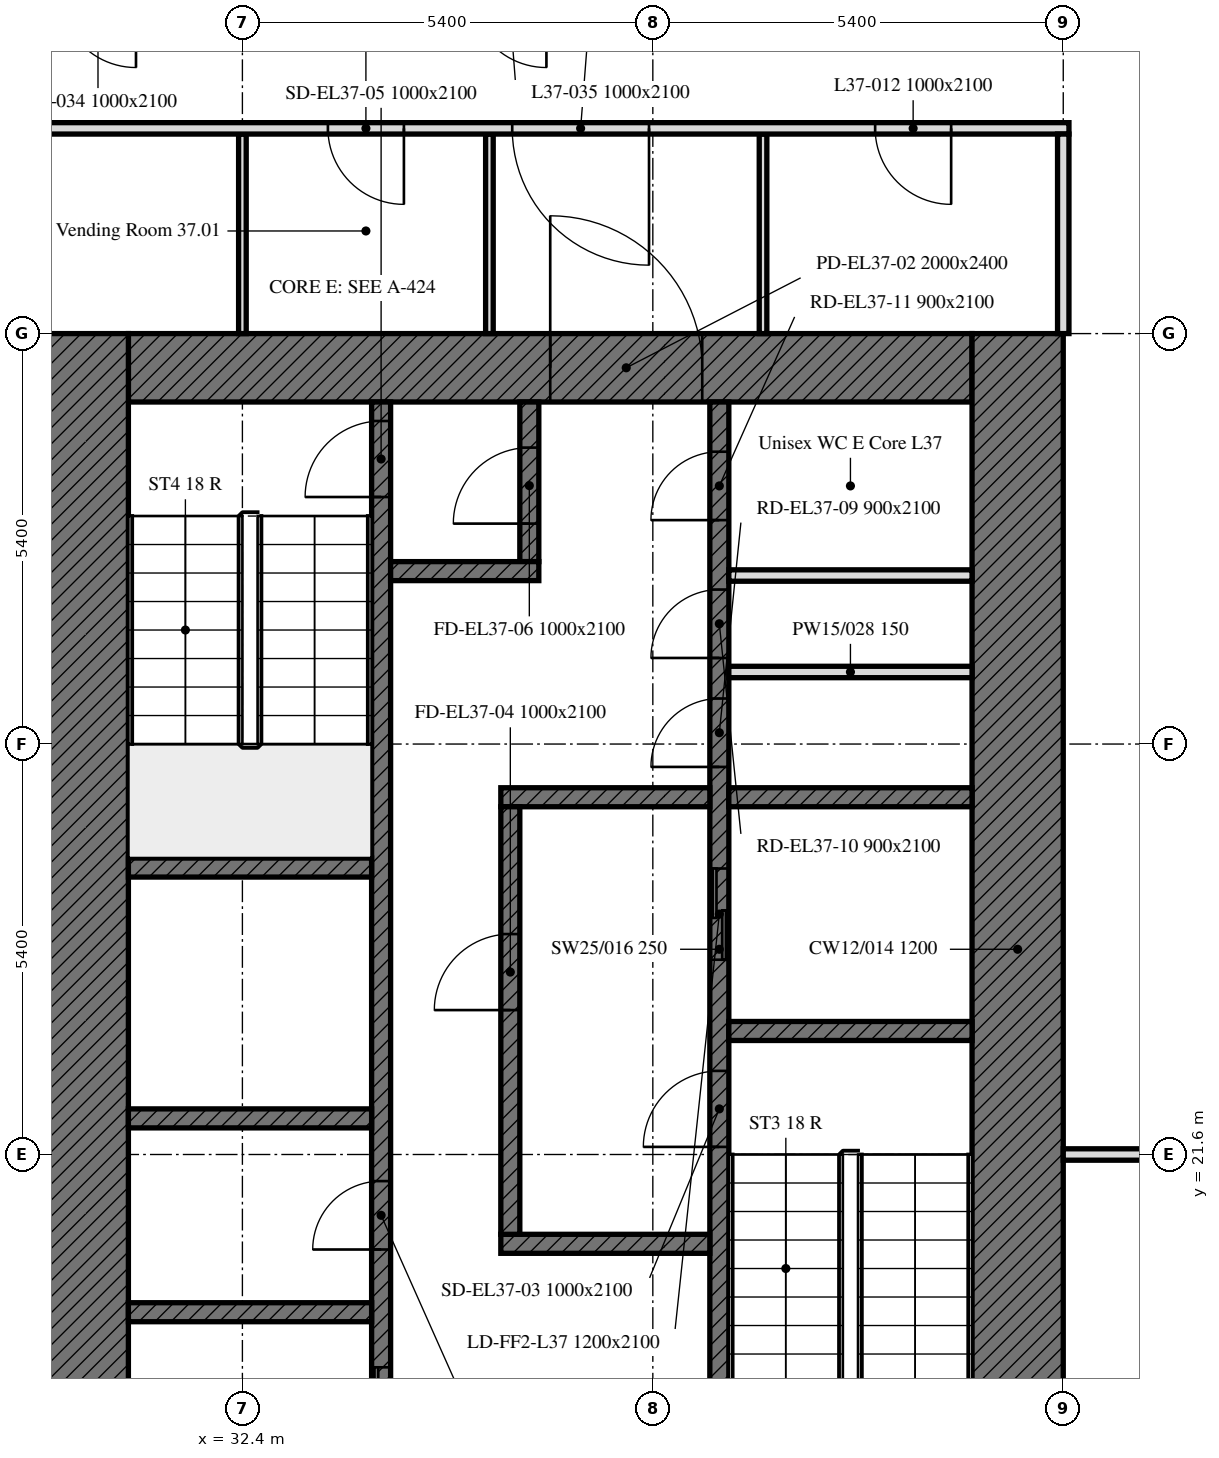
"""IFC4 building model, lengths in metres.
Left out: names, types, materials, properties, quantities, classifications, styles, units other than length and angle.
Written with IfcOpenShell. Run it as: python <this file> out.ifc"""

import sys

from ifc_helpers import new_model, si_unit, direction, frame, frame_2d, origin, place, context, subcontext, project, spatial, rectangle, extrude, element, fill, save


model = new_model("IFC4")
c1 = context("Model", 3, precision=1e-05, world=origin(), true_north=direction((0.0, 1.0)))
c2 = subcontext(c1, "Body", "Model", "MODEL_VIEW")
j1 = project(units=[si_unit("LENGTHUNIT", "METRE"), si_unit("PLANEANGLEUNIT", "RADIAN")], contexts=[c1])
p1 = place(None, origin())
s1 = spatial("IfcSite", under=j1, at=p1, CompositionType="ELEMENT")
p2 = place(p1, origin())
s2 = spatial("IfcBuilding", under=s1, at=p2, CompositionType="ELEMENT")
p3 = place(p2, frame((0.0, 0.0, 159.4)))
s3 = spatial("IfcBuildingStorey", under=s2, at=p3, CompositionType="ELEMENT", Elevation=159.4)
p4 = place(p3, frame((30.9, 31.95, 0.0), z_axis=(0.0, 0.0, 1.0), x_axis=(1.0, 0.0, 0.0)))
e1 = element("IfcWall", 1, at=p4, inside=s3, PredefinedType="SOLIDWALL", context=c2, shape_type="SweptSolid", body=[
    extrude(rectangle(XDim=11.1, YDim=0.9, at=frame_2d((5.55, 0.0))), origin(), (0.0, 0.0, 1.0), 3.0),
])
p5 = place(p4, frame((5.55, 0.0, 0.0)))
e2 = element("IfcOpeningElement", 2, at=p5, cuts=e1, PredefinedType="OPENING", context=c2, shape_type="SweptSolid", body=[
    extrude(rectangle(XDim=2.0, YDim=2.4, at=frame_2d((1.0, 1.2))), frame((0.0, 0.45, 0.0), z_axis=(0.0, -1.0, 0.0), x_axis=(1.0, 0.0, 0.0)), (0.0, 0.0, 1.0), 0.9),
])
for number, where, z_axis, x_axis in (
    (3, (42.6, 32.4, 0.0), (0.0, 0.0, 1.0), (0.0, -1.0, 0.0)),
    (4, (30.3, 16.2, 0.0), (0.0, 0.0, 1.0), (0.0, 1.0, 0.0)),
):
    element("IfcWall", number, at=place(p3, frame(where, z_axis=z_axis, x_axis=x_axis)), inside=s3, PredefinedType="SOLIDWALL", context=c2, shape_type="SweptSolid", body=[
        extrude(rectangle(XDim=16.2, YDim=1.2, at=frame_2d((8.1, 0.0))), origin(), (0.0, 0.0, 1.0), 3.0),
    ])
p6 = place(p3, frame((38.675, 17.1, 0.0), z_axis=(0.0, 0.0, 1.0), x_axis=(0.0, 1.0, 0.0)))
e5 = element("IfcWall", 5, at=p6, inside=s3, PredefinedType="SOLIDWALL", context=c2, shape_type="SweptSolid", body=[
    extrude(rectangle(XDim=14.4, YDim=0.25, at=frame_2d((7.2, 0.0))), origin(), (0.0, 0.0, 1.0), 3.0),
])
p7 = place(p6, frame((4.6, 0.0, 0.0)))
e6 = element("IfcOpeningElement", 6, at=p7, cuts=e5, PredefinedType="OPENING", context=c2, shape_type="SweptSolid", body=[
    extrude(rectangle(XDim=1.0, YDim=2.1, at=frame_2d((0.5, 1.05))), frame((0.0, 0.125, 0.0), z_axis=(0.0, -1.0, 0.0), x_axis=(1.0, 0.0, 0.0)), (0.0, 0.0, 1.0), 0.25),
])
p8 = place(p6, frame((7.062, 0.0, 0.0)))
e7 = element("IfcOpeningElement", 7, at=p8, cuts=e5, PredefinedType="OPENING", context=c2, shape_type="SweptSolid", body=[
    extrude(rectangle(XDim=1.2, YDim=2.1, at=frame_2d((0.6, 1.05))), frame((0.0, 0.125, 0.0), z_axis=(0.0, -1.0, 0.0), x_axis=(1.0, 0.0, 0.0)), (0.0, 0.0, 1.0), 0.25),
])
p9 = place(p6, frame((9.599, 0.0, 0.0)))
e8 = element("IfcOpeningElement", 8, at=p9, cuts=e5, PredefinedType="OPENING", context=c2, shape_type="SweptSolid", body=[
    extrude(rectangle(XDim=0.9, YDim=2.1, at=frame_2d((0.45, 1.05))), frame((0.0, 0.125, 0.0), z_axis=(0.0, -1.0, 0.0), x_axis=(1.0, 0.0, 0.0)), (0.0, 0.0, 1.0), 0.25),
])
p10 = place(p6, frame((11.032, 0.0, 0.0)))
e9 = element("IfcOpeningElement", 9, at=p10, cuts=e5, PredefinedType="OPENING", context=c2, shape_type="SweptSolid", body=[
    extrude(rectangle(XDim=0.9, YDim=2.1, at=frame_2d((0.45, 1.05))), frame((0.0, 0.125, 0.0), z_axis=(0.0, -1.0, 0.0), x_axis=(1.0, 0.0, 0.0)), (0.0, 0.0, 1.0), 0.25),
])
p11 = place(p6, frame((12.846, 0.0, 0.0)))
e10 = element("IfcOpeningElement", 10, at=p11, cuts=e5, PredefinedType="OPENING", context=c2, shape_type="SweptSolid", body=[
    extrude(rectangle(XDim=0.9, YDim=2.1, at=frame_2d((0.45, 1.05))), frame((0.0, 0.125, 0.0), z_axis=(0.0, -1.0, 0.0), x_axis=(1.0, 0.0, 0.0)), (0.0, 0.0, 1.0), 0.25),
])
p12 = place(p3, frame((34.225, 17.1, 0.0), z_axis=(0.0, 0.0, 1.0), x_axis=(0.0, 1.0, 0.0)))
e11 = element("IfcWall", 11, at=p12, inside=s3, PredefinedType="SOLIDWALL", context=c2, shape_type="SweptSolid", body=[
    extrude(rectangle(XDim=14.4, YDim=0.25, at=frame_2d((7.2, 0.0))), origin(), (0.0, 0.0, 1.0), 3.0),
])
p13 = place(p12, frame((13.15, 0.0, 0.0)))
e12 = element("IfcOpeningElement", 12, at=p13, cuts=e11, PredefinedType="OPENING", context=c2, shape_type="SweptSolid", body=[
    extrude(rectangle(XDim=1.0, YDim=2.1, at=frame_2d((0.5, 1.05))), frame((0.0, 0.125, 0.0), z_axis=(0.0, -1.0, 0.0), x_axis=(1.0, 0.0, 0.0)), (0.0, 0.0, 1.0), 0.25),
])
p14 = place(p12, frame((0.6, 0.0, 0.0)))
e13 = element("IfcOpeningElement", 13, at=p14, cuts=e11, PredefinedType="OPENING", context=c2, shape_type="SweptSolid", body=[
    extrude(rectangle(XDim=1.1, YDim=2.1, at=frame_2d((0.55, 1.05))), frame((0.0, 0.125, 0.0), z_axis=(0.0, -1.0, 0.0), x_axis=(1.0, 0.0, 0.0)), (0.0, 0.0, 1.0), 0.25),
])
p15 = place(p12, frame((3.25, 0.0, 0.0)))
e14 = element("IfcOpeningElement", 14, at=p15, cuts=e11, PredefinedType="OPENING", context=c2, shape_type="SweptSolid", body=[
    extrude(rectangle(XDim=0.9, YDim=2.1, at=frame_2d((0.45, 1.05))), frame((0.0, 0.125, 0.0), z_axis=(0.0, -1.0, 0.0), x_axis=(1.0, 0.0, 0.0)), (0.0, 0.0, 1.0), 0.25),
])
p16 = place(p3, frame((38.8, 23.225, 0.0), z_axis=(0.0, 0.0, 1.0), x_axis=(1.0, 0.0, 0.0)))
e15 = element("IfcWall", 15, at=p16, inside=s3, PredefinedType="SOLIDWALL", context=c2, shape_type="SweptSolid", body=[
    extrude(rectangle(XDim=3.2, YDim=0.25, at=frame_2d((1.6, 0.0))), origin(), (0.0, 0.0, 1.0), 3.0),
])
for number, where, z_axis, x_axis in (
    (16, (30.9, 25.375, 0.0), (0.0, 0.0, 1.0), (1.0, 0.0, 0.0)),
    (17, (30.9, 22.075, 0.0), (0.0, 0.0, 1.0), (1.0, 0.0, 0.0)),
):
    element("IfcWall", number, at=place(p3, frame(where, z_axis=z_axis, x_axis=x_axis)), inside=s3, PredefinedType="SOLIDWALL", context=c2, shape_type="SweptSolid", body=[
        extrude(rectangle(XDim=3.2, YDim=0.25, at=frame_2d((1.6, 0.0))), origin(), (0.0, 0.0, 1.0), 3.0),
    ])
p17 = place(p3, frame((38.8, 26.3, 0.0), z_axis=(0.0, 0.0, 1.0), x_axis=(1.0, 0.0, 0.0)))
e18 = element("IfcWall", 18, at=p17, inside=s3, PredefinedType="SOLIDWALL", context=c2, shape_type="SweptSolid", body=[
    extrude(rectangle(XDim=3.2, YDim=0.25, at=frame_2d((1.6, 0.0))), origin(), (0.0, 0.0, 1.0), 3.0),
])
for number, where, z_axis, x_axis in (
    (19, (35.8, 26.3, 0.0), (0.0, 0.0, 1.0), (1.0, 0.0, 0.0)),
    (20, (35.8, 20.425, 0.0), (0.0, 0.0, 1.0), (1.0, 0.0, 0.0)),
):
    element("IfcWall", number, at=place(p3, frame(where, z_axis=z_axis, x_axis=x_axis)), inside=s3, PredefinedType="SOLIDWALL", context=c2, shape_type="SweptSolid", body=[
        extrude(rectangle(XDim=2.75, YDim=0.25, at=frame_2d((1.375, 0.0))), origin(), (0.0, 0.0, 1.0), 3.0),
    ])
p18 = place(p3, frame((36.175, 29.4, 0.0), z_axis=(0.0, 0.0, 1.0), x_axis=(0.0, 1.0, 0.0)))
e21 = element("IfcWall", 21, at=p18, inside=s3, PredefinedType="SOLIDWALL", context=c2, shape_type="SweptSolid", body=[
    extrude(rectangle(XDim=2.1, YDim=0.25, at=frame_2d((1.05, 0.0))), origin(), (0.0, 0.0, 1.0), 3.0),
])
p19 = place(p18, frame((0.5, 0.0, 0.0)))
e22 = element("IfcOpeningElement", 22, at=p19, cuts=e21, PredefinedType="OPENING", context=c2, shape_type="SweptSolid", body=[
    extrude(rectangle(XDim=1.0, YDim=2.1, at=frame_2d((0.5, 1.05))), frame((0.0, 0.125, 0.0), z_axis=(0.0, -1.0, 0.0), x_axis=(1.0, 0.0, 0.0)), (0.0, 0.0, 1.0), 0.25),
])
p20 = place(p3, frame((34.35, 29.275, 0.0), z_axis=(0.0, 0.0, 1.0), x_axis=(1.0, 0.0, 0.0)))
e23 = element("IfcWall", 23, at=p20, inside=s3, PredefinedType="SOLIDWALL", context=c2, shape_type="SweptSolid", body=[
    extrude(rectangle(XDim=1.95, YDim=0.25, at=frame_2d((0.975, 0.0))), origin(), (0.0, 0.0, 1.0), 3.0),
])
p21 = place(p3, frame((35.925, 20.55, 0.0), z_axis=(0.0, 0.0, 1.0), x_axis=(0.0, 1.0, 0.0)))
e24 = element("IfcWall", 24, at=p21, inside=s3, PredefinedType="SOLIDWALL", context=c2, shape_type="SweptSolid", body=[
    extrude(rectangle(XDim=5.625, YDim=0.25, at=frame_2d((2.812, 0.0))), origin(), (0.0, 0.0, 1.0), 3.0),
])
p22 = place(p21, frame((2.95, 0.0, 0.0)))
e25 = element("IfcOpeningElement", 25, at=p22, cuts=e24, PredefinedType="OPENING", context=c2, shape_type="SweptSolid", body=[
    extrude(rectangle(XDim=1.0, YDim=2.1, at=frame_2d((0.5, 1.05))), frame((0.0, 0.125, 0.0), z_axis=(0.0, -1.0, 0.0), x_axis=(1.0, 0.0, 0.0)), (0.0, 0.0, 1.0), 0.25),
])
p23 = place(p3, frame((30.9, 19.525, 0.0), z_axis=(0.0, 0.0, 1.0), x_axis=(1.0, 0.0, 0.0)))
e26 = element("IfcWall", 26, at=p23, inside=s3, PredefinedType="SOLIDWALL", context=c2, shape_type="SweptSolid", body=[
    extrude(rectangle(XDim=3.2, YDim=0.25, at=frame_2d((1.6, 0.0))), origin(), (0.0, 0.0, 1.0), 3.0),
])
for number, where, z_axis, x_axis in (
    (27, (38.8, 27.948, 0.0), (0.0, 0.0, 1.0), (1.0, 0.0, 0.0)),
    (28, (38.8, 29.217, 0.0), (0.0, 0.0, 1.0), (1.0, 0.0, 0.0)),
):
    element("IfcWall", number, at=place(p3, frame(where, z_axis=z_axis, x_axis=x_axis)), inside=s3, PredefinedType="PARTITIONING", context=c2, shape_type="SweptSolid", body=[
        extrude(rectangle(XDim=3.2, YDim=0.15, at=frame_2d((1.6, 0.0))), origin(), (0.0, 0.0, 1.0), 3.0),
    ])
for number, where, z_axis, x_axis in (
    (29, (32.4, 32.4, 0.0), (0.0, 0.0, 1.0), (0.0, 1.0, 0.0)),
    (30, (35.65, 35.025, 0.0), (0.0, 0.0, 1.0), (0.0, -1.0, 0.0)),
    (31, (39.25, 32.4, 0.0), (0.0, 0.0, 1.0), (0.0, 1.0, 0.0)),
):
    element("IfcWall", number, at=place(p3, frame(where, z_axis=z_axis, x_axis=x_axis)), inside=s3, PredefinedType="PARTITIONING", context=c2, shape_type="SweptSolid", body=[
        extrude(rectangle(XDim=2.625, YDim=0.1, at=frame_2d((1.312, 0.0))), origin(), (0.0, 0.0, 1.0), 3.0),
    ])
p24 = place(p3, frame((43.2, 21.6, 0.0), z_axis=(0.0, 0.0, 1.0), x_axis=(1.0, 0.0, 0.0)))
e32 = element("IfcWall", 32, at=p24, inside=s3, PredefinedType="PARTITIONING", context=c2, shape_type="SweptSolid", body=[
    extrude(rectangle(XDim=4.649, YDim=0.15, at=frame_2d((2.325, 0.0))), origin(), (0.0, 0.0, 1.0), 2.4),
])
p25 = place(p3, frame((43.275, 35.1, 0.0), z_axis=(0.0, 0.0, 1.0), x_axis=(-1.0, 0.0, 0.0)))
e33 = element("IfcWall", 33, at=p25, inside=s3, PredefinedType="PARTITIONING", context=c2, shape_type="SweptSolid", body=[
    extrude(rectangle(XDim=37.124, YDim=0.15, at=frame_2d((18.562, 0.0))), origin(), (0.0, 0.0, 1.0), 3.0),
])
p26 = place(p25, frame((18.475, 0.0, 0.0)))
e34 = element("IfcOpeningElement", 34, at=p26, cuts=e33, PredefinedType="OPENING", context=c2, shape_type="SweptSolid", body=[
    extrude(rectangle(XDim=1.0, YDim=2.1, at=frame_2d((0.5, 1.05))), frame((0.0, 0.075, 0.0), z_axis=(0.0, -1.0, 0.0), x_axis=(1.0, 0.0, 0.0)), (0.0, 0.0, 1.0), 0.15),
])
p27 = place(p25, frame((34.095, 0.0, 0.0)))
e35 = element("IfcOpeningElement", 35, at=p27, cuts=e33, PredefinedType="OPENING", context=c2, shape_type="SweptSolid", body=[
    extrude(rectangle(XDim=1.0, YDim=2.1, at=frame_2d((0.5, 1.05))), frame((0.0, 0.075, 0.0), z_axis=(0.0, -1.0, 0.0), x_axis=(1.0, 0.0, 0.0)), (0.0, 0.0, 1.0), 0.15),
])
p28 = place(p25, frame((8.75, 0.0, 0.0)))
e36 = element("IfcOpeningElement", 36, at=p28, cuts=e33, PredefinedType="OPENING", context=c2, shape_type="SweptSolid", body=[
    extrude(rectangle(XDim=1.0, YDim=2.1, at=frame_2d((0.5, 1.05))), frame((0.0, 0.075, 0.0), z_axis=(0.0, -1.0, 0.0), x_axis=(1.0, 0.0, 0.0)), (0.0, 0.0, 1.0), 0.15),
])
p29 = place(p25, frame((1.55, 0.0, 0.0)))
e37 = element("IfcOpeningElement", 37, at=p29, cuts=e33, PredefinedType="OPENING", context=c2, shape_type="SweptSolid", body=[
    extrude(rectangle(XDim=1.0, YDim=2.1, at=frame_2d((0.5, 1.05))), frame((0.0, 0.075, 0.0), z_axis=(0.0, -1.0, 0.0), x_axis=(1.0, 0.0, 0.0)), (0.0, 0.0, 1.0), 0.15),
])
p30 = place(p25, frame((28.2, 0.0, 0.0)))
e38 = element("IfcOpeningElement", 38, at=p30, cuts=e33, PredefinedType="OPENING", context=c2, shape_type="SweptSolid", body=[
    extrude(rectangle(XDim=1.0, YDim=2.1, at=frame_2d((0.5, 1.05))), frame((0.0, 0.075, 0.0), z_axis=(0.0, -1.0, 0.0), x_axis=(1.0, 0.0, 0.0)), (0.0, 0.0, 1.0), 0.15),
])
p31 = place(p25, frame((30.625, 0.0, 0.0)))
e39 = element("IfcOpeningElement", 39, at=p31, cuts=e33, PredefinedType="OPENING", context=c2, shape_type="SweptSolid", body=[
    extrude(rectangle(XDim=1.8, YDim=2.4, at=frame_2d((0.9, 1.2))), frame((0.0, 0.075, 0.0), z_axis=(0.0, -1.0, 0.0), x_axis=(1.0, 0.0, 0.0)), (0.0, 0.0, 1.0), 0.15),
])
p32 = place(p25, frame((5.525, 0.0, 0.0)))
e40 = element("IfcOpeningElement", 40, at=p32, cuts=e33, PredefinedType="OPENING", context=c2, shape_type="SweptSolid", body=[
    extrude(rectangle(XDim=1.8, YDim=2.4, at=frame_2d((0.9, 1.2))), frame((0.0, 0.075, 0.0), z_axis=(0.0, -1.0, 0.0), x_axis=(1.0, 0.0, 0.0)), (0.0, 0.0, 1.0), 0.15),
])
p33 = place(p3, frame((43.2, 35.025, 0.0), z_axis=(0.0, 0.0, 1.0), x_axis=(0.0, -1.0, 0.0)))
e41 = element("IfcWall", 41, at=p33, inside=s3, PredefinedType="PARTITIONING", context=c2, shape_type="SweptSolid", body=[
    extrude(rectangle(XDim=2.625, YDim=0.15, at=frame_2d((1.312, 0.0))), origin(), (0.0, 0.0, 1.0), 3.0),
])
p34 = place(p5, origin())
e42 = element("IfcDoor", 42, at=p34, inside=s3, OperationType="DOUBLE_DOOR_SINGLE_SWING", PredefinedType="DOOR", context=c2, shape_type="SweptSolid", body=[
    extrude(rectangle(XDim=2.0, YDim=2.4, at=frame_2d((1.0, 1.2))), frame((0.0, 0.025, 0.0), z_axis=(0.0, -1.0, 0.0), x_axis=(1.0, 0.0, 0.0)), (0.0, 0.0, 1.0), 0.05),
])
fill(e2, e42)
p35 = place(p7, origin())
e43 = element("IfcDoor", 43, at=p35, inside=s3, OperationType="SINGLE_SWING_LEFT", PredefinedType="DOOR", context=c2, shape_type="SweptSolid", body=[
    extrude(rectangle(XDim=1.0, YDim=2.1, at=frame_2d((0.5, 1.05))), frame((0.0, 0.025, 0.0), z_axis=(0.0, -1.0, 0.0), x_axis=(1.0, 0.0, 0.0)), (0.0, 0.0, 1.0), 0.05),
])
fill(e6, e43)
p36 = place(p22, origin())
e44 = element("IfcDoor", 44, at=p36, inside=s3, OperationType="SINGLE_SWING_LEFT", PredefinedType="DOOR", context=c2, shape_type="SweptSolid", body=[
    extrude(rectangle(XDim=1.0, YDim=2.1, at=frame_2d((0.5, 1.05))), frame((0.0, 0.025, 0.0), z_axis=(0.0, -1.0, 0.0), x_axis=(1.0, 0.0, 0.0)), (0.0, 0.0, 1.0), 0.05),
])
fill(e25, e44)
p37 = place(p13, origin())
e45 = element("IfcDoor", 45, at=p37, inside=s3, OperationType="SINGLE_SWING_LEFT", PredefinedType="DOOR", context=c2, shape_type="SweptSolid", body=[
    extrude(rectangle(XDim=1.0, YDim=2.1, at=frame_2d((0.5, 1.05))), frame((0.0, 0.025, 0.0), z_axis=(0.0, -1.0, 0.0), x_axis=(1.0, 0.0, 0.0)), (0.0, 0.0, 1.0), 0.05),
])
fill(e12, e45)
p38 = place(p19, origin())
e46 = element("IfcDoor", 46, at=p38, inside=s3, OperationType="SINGLE_SWING_LEFT", PredefinedType="DOOR", context=c2, shape_type="SweptSolid", body=[
    extrude(rectangle(XDim=1.0, YDim=2.1, at=frame_2d((0.5, 1.05))), frame((0.0, 0.025, 0.0), z_axis=(0.0, -1.0, 0.0), x_axis=(1.0, 0.0, 0.0)), (0.0, 0.0, 1.0), 0.05),
])
fill(e22, e46)
p39 = place(p8, origin())
e47 = element("IfcDoor", 47, at=p39, inside=s3, OperationType="DOUBLE_DOOR_SLIDING", PredefinedType="DOOR", context=c2, shape_type="SweptSolid", body=[
    extrude(rectangle(XDim=1.2, YDim=2.1, at=frame_2d((0.6, 1.05))), frame((0.0, 0.025, 0.0), z_axis=(0.0, -1.0, 0.0), x_axis=(1.0, 0.0, 0.0)), (0.0, 0.0, 1.0), 0.05),
])
fill(e7, e47)
p40 = place(p14, origin())
e48 = element("IfcDoor", 48, at=p40, inside=s3, OperationType="DOUBLE_DOOR_SLIDING", PredefinedType="DOOR", context=c2, shape_type="SweptSolid", body=[
    extrude(rectangle(XDim=1.1, YDim=2.1, at=frame_2d((0.55, 1.05))), frame((0.0, 0.025, 0.0), z_axis=(0.0, -1.0, 0.0), x_axis=(1.0, 0.0, 0.0)), (0.0, 0.0, 1.0), 0.05),
])
fill(e13, e48)
p41 = place(p9, origin())
e49 = element("IfcDoor", 49, at=p41, inside=s3, OperationType="SINGLE_SWING_LEFT", PredefinedType="DOOR", context=c2, shape_type="SweptSolid", body=[
    extrude(rectangle(XDim=0.9, YDim=2.1, at=frame_2d((0.45, 1.05))), frame((0.0, 0.025, 0.0), z_axis=(0.0, -1.0, 0.0), x_axis=(1.0, 0.0, 0.0)), (0.0, 0.0, 1.0), 0.05),
])
fill(e8, e49)
p42 = place(p10, origin())
e50 = element("IfcDoor", 50, at=p42, inside=s3, OperationType="SINGLE_SWING_LEFT", PredefinedType="DOOR", context=c2, shape_type="SweptSolid", body=[
    extrude(rectangle(XDim=0.9, YDim=2.1, at=frame_2d((0.45, 1.05))), frame((0.0, 0.025, 0.0), z_axis=(0.0, -1.0, 0.0), x_axis=(1.0, 0.0, 0.0)), (0.0, 0.0, 1.0), 0.05),
])
fill(e9, e50)
p43 = place(p11, origin())
e51 = element("IfcDoor", 51, at=p43, inside=s3, OperationType="SINGLE_SWING_LEFT", PredefinedType="DOOR", context=c2, shape_type="SweptSolid", body=[
    extrude(rectangle(XDim=0.9, YDim=2.1, at=frame_2d((0.45, 1.05))), frame((0.0, 0.025, 0.0), z_axis=(0.0, -1.0, 0.0), x_axis=(1.0, 0.0, 0.0)), (0.0, 0.0, 1.0), 0.05),
])
fill(e10, e51)
p44 = place(p15, origin())
e52 = element("IfcDoor", 52, at=p44, inside=s3, OperationType="SINGLE_SWING_LEFT", PredefinedType="DOOR", context=c2, shape_type="SweptSolid", body=[
    extrude(rectangle(XDim=0.9, YDim=2.1, at=frame_2d((0.45, 1.05))), frame((0.0, 0.025, 0.0), z_axis=(0.0, -1.0, 0.0), x_axis=(1.0, 0.0, 0.0)), (0.0, 0.0, 1.0), 0.05),
])
fill(e14, e52)
p45 = place(p28, origin())
e53 = element("IfcDoor", 53, at=p45, inside=s3, OperationType="SINGLE_SWING_LEFT", PredefinedType="DOOR", context=c2, shape_type="SweptSolid", body=[
    extrude(rectangle(XDim=1.0, YDim=2.1, at=frame_2d((0.5, 1.05))), frame((0.0, 0.025, 0.0), z_axis=(0.0, -1.0, 0.0), x_axis=(1.0, 0.0, 0.0)), (0.0, 0.0, 1.0), 0.05),
])
fill(e36, e53)
p46 = place(p29, origin())
e54 = element("IfcDoor", 54, at=p46, inside=s3, OperationType="SINGLE_SWING_RIGHT", PredefinedType="DOOR", context=c2, shape_type="SweptSolid", body=[
    extrude(rectangle(XDim=1.0, YDim=2.1, at=frame_2d((0.5, 1.05))), frame((0.0, 0.025, 0.0), z_axis=(0.0, -1.0, 0.0), x_axis=(1.0, 0.0, 0.0)), (0.0, 0.0, 1.0), 0.05),
])
fill(e37, e54)
p47 = place(p32, origin())
e55 = element("IfcDoor", 55, at=p47, inside=s3, OperationType="DOUBLE_DOOR_SINGLE_SWING", PredefinedType="DOOR", context=c2, shape_type="SweptSolid", body=[
    extrude(rectangle(XDim=1.8, YDim=2.4, at=frame_2d((0.9, 1.2))), frame((0.0, 0.025, 0.0), z_axis=(0.0, -1.0, 0.0), x_axis=(1.0, 0.0, 0.0)), (0.0, 0.0, 1.0), 0.05),
])
fill(e40, e55)
save(model, sys.argv[1])
